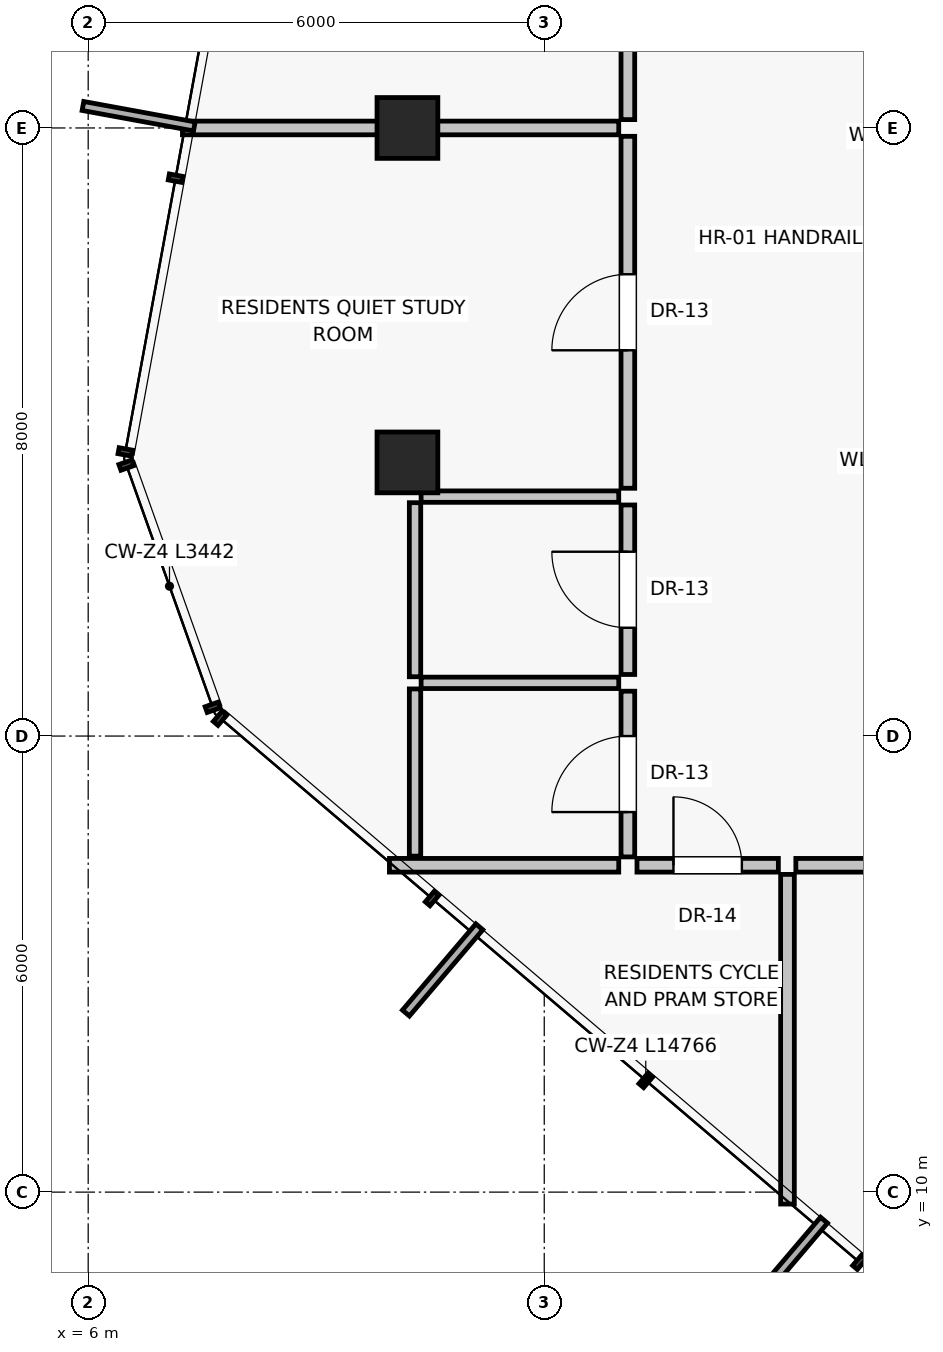
"""IFC4 building model, lengths in metres.
Left out: names, types, materials, properties, quantities, classifications, styles, units other than length and angle.
Written with IfcOpenShell. Run it as: python <this file> out.ifc"""

import sys

from ifc_helpers import new_model, si_unit, direction, frame, frame_2d, origin, origin_2d, place, context, subcontext, project, spatial, rectangle, extrude, source, transform, mapped, element, fill, save


model = new_model("IFC4")
c1 = context("Model", 3, precision=1e-05, world=origin(), true_north=direction((0.0, 1.0)))
c2 = subcontext(c1, "Body", "Model", "MODEL_VIEW")
j1 = project(units=[si_unit("LENGTHUNIT", "METRE"), si_unit("PLANEANGLEUNIT", "RADIAN")], contexts=[c1])
p1 = place(None, origin())
s1 = spatial("IfcSite", under=j1, at=p1, CompositionType="ELEMENT")
p2 = place(p1, origin())
s2 = spatial("IfcBuilding", under=s1, at=p2, CompositionType="ELEMENT")
p3 = place(p2, frame((0.0, 0.0, 244.75)))
s3 = spatial("IfcBuildingStorey", under=s2, at=p3, CompositionType="ELEMENT", Elevation=244.75)
for number, where, z_axis, x_axis in (
    (1, (10.2, 24.0, 0.0), (0.0, 0.0, 1.0), (1.0, 0.0, 0.0)),
    (2, (10.2, 19.6, 0.0), (0.0, 0.0, 1.0), (1.0, 0.0, 0.0)),
):
    element("IfcColumn", number, at=place(p3, frame(where, z_axis=z_axis, x_axis=x_axis)), inside=s3, PredefinedType="COLUMN", context=c2, shape_type="SweptSolid", body=[
        extrude(rectangle(XDim=0.8, YDim=0.8, at=origin_2d()), origin(), (0.0, 0.0, 1.0), 3.25),
    ])
p4 = place(p3, frame((15.2, 14.18, 0.0), z_axis=(0.0, 0.0, 1.0), x_axis=(0.0, -1.0, 0.0)))
e3 = element("IfcWall", 3, at=p4, inside=s3, PredefinedType="PARTITIONING", context=c2, shape_type="SweptSolid", body=[
    extrude(rectangle(XDim=4.337, YDim=0.18, at=frame_2d((2.168, 0.0))), origin(), (0.0, 0.0, 1.0), 3.015),
])
p5 = place(p3, frame((15.31, 14.3, 0.0), z_axis=(0.0, 0.0, 1.0), x_axis=(1.0, 0.0, 0.0)))
e4 = element("IfcWall", 4, at=p5, inside=s3, PredefinedType="PARTITIONING", context=c2, shape_type="SweptSolid", body=[
    extrude(rectangle(XDim=8.05, YDim=0.18, at=frame_2d((4.025, 0.0))), origin(), (0.0, 0.0, 1.0), 3.015),
])
p6 = place(p5, frame((3.125, 0.0, 0.0)))
e5 = element("IfcOpeningElement", 5, at=p6, cuts=e4, PredefinedType="OPENING", context=c2, shape_type="SweptSolid", body=[
    extrude(rectangle(XDim=1.8, YDim=2.25, at=frame_2d((0.9, 1.125))), frame((0.0, 0.1, 0.0), z_axis=(0.0, -1.0, 0.0), x_axis=(1.0, 0.0, 0.0)), (0.0, 0.0, 1.0), 0.2),
])
p7 = place(p3, frame((12.98, 14.3, 0.0), z_axis=(0.0, 0.0, 1.0), x_axis=(-1.0, 0.0, 0.0)))
e6 = element("IfcWall", 6, at=p7, inside=s3, PredefinedType="PARTITIONING", context=c2, shape_type="SweptSolid", body=[
    extrude(rectangle(XDim=3.017, YDim=0.18, at=frame_2d((1.508, 0.0))), origin(), (0.0, 0.0, 1.0), 3.015),
])
p8 = place(p3, frame((13.1, 14.41, 0.0), z_axis=(0.0, 0.0, 1.0), x_axis=(0.0, 1.0, 0.0)))
e7 = element("IfcWall", 7, at=p8, inside=s3, PredefinedType="PARTITIONING", context=c2, shape_type="SweptSolid", body=[
    extrude(rectangle(XDim=2.18, YDim=0.18, at=frame_2d((1.09, 0.0))), origin(), (0.0, 0.0, 1.0), 3.015),
])
p9 = place(p8, frame((0.59, 0.0, 0.0)))
e8 = element("IfcOpeningElement", 8, at=p9, cuts=e7, PredefinedType="OPENING", context=c2, shape_type="SweptSolid", body=[
    extrude(rectangle(XDim=1.0, YDim=2.01, at=frame_2d((0.5, 1.005))), frame((0.0, 0.1, 0.0), z_axis=(0.0, -1.0, 0.0), x_axis=(1.0, 0.0, 0.0)), (0.0, 0.0, 1.0), 0.2),
])
p10 = place(p3, frame((13.1, 16.81, 0.0), z_axis=(0.0, 0.0, 1.0), x_axis=(0.0, 1.0, 0.0)))
e9 = element("IfcWall", 9, at=p10, inside=s3, PredefinedType="PARTITIONING", context=c2, shape_type="SweptSolid", body=[
    extrude(rectangle(XDim=2.23, YDim=0.18, at=frame_2d((1.115, 0.0))), origin(), (0.0, 0.0, 1.0), 2.662),
])
p11 = place(p10, frame((0.615, 0.0, 0.0)))
e10 = element("IfcOpeningElement", 10, at=p11, cuts=e9, PredefinedType="OPENING", context=c2, shape_type="SweptSolid", body=[
    extrude(rectangle(XDim=1.0, YDim=2.01, at=frame_2d((0.5, 1.005))), frame((0.0, 0.1, 0.0), z_axis=(0.0, -1.0, 0.0), x_axis=(1.0, 0.0, 0.0)), (0.0, 0.0, 1.0), 0.2),
])
p12 = place(p3, frame((13.1, 19.26, 0.0), z_axis=(0.0, 0.0, 1.0), x_axis=(0.0, 1.0, 0.0)))
e11 = element("IfcWall", 11, at=p12, inside=s3, PredefinedType="PARTITIONING", context=c2, shape_type="SweptSolid", body=[
    extrude(rectangle(XDim=4.63, YDim=0.18, at=frame_2d((2.315, 0.0))), origin(), (0.0, 0.0, 1.0), 2.662),
])
p13 = place(p12, frame((1.815, 0.0, 0.0)))
e12 = element("IfcOpeningElement", 12, at=p13, cuts=e11, PredefinedType="OPENING", context=c2, shape_type="SweptSolid", body=[
    extrude(rectangle(XDim=1.0, YDim=2.01, at=frame_2d((0.5, 1.005))), frame((0.0, 0.1, 0.0), z_axis=(0.0, -1.0, 0.0), x_axis=(1.0, 0.0, 0.0)), (0.0, 0.0, 1.0), 0.2),
])
p14 = place(p3, frame((13.1, 24.11, 0.0), z_axis=(0.0, 0.0, 1.0), x_axis=(0.0, 1.0, 0.0)))
e13 = element("IfcWall", 13, at=p14, inside=s3, PredefinedType="PARTITIONING", context=c2, shape_type="SweptSolid", body=[
    extrude(rectangle(XDim=9.28, YDim=0.18, at=frame_2d((4.64, 0.0))), origin(), (0.0, 0.0, 1.0), 2.662),
])
p15 = place(p14, frame((4.14, 0.0, 0.0)))
e14 = element("IfcOpeningElement", 14, at=p15, cuts=e13, PredefinedType="OPENING", context=c2, shape_type="SweptSolid", body=[
    extrude(rectangle(XDim=1.0, YDim=2.01, at=frame_2d((0.5, 1.005))), frame((0.0, 0.1, 0.0), z_axis=(0.0, -1.0, 0.0), x_axis=(1.0, 0.0, 0.0)), (0.0, 0.0, 1.0), 0.2),
])
for number, where, z_axis, x_axis in (
    (15, (12.98, 16.7, 0.0), (0.0, 0.0, 1.0), (-1.0, 0.0, 0.0)),
    (16, (12.98, 19.15, 0.0), (0.0, 0.0, 1.0), (-1.0, 0.0, 0.0)),
):
    element("IfcWall", number, at=place(p3, frame(where, z_axis=z_axis, x_axis=x_axis)), inside=s3, PredefinedType="PARTITIONING", context=c2, shape_type="SweptSolid", body=[
        extrude(rectangle(XDim=2.6, YDim=0.15, at=frame_2d((1.3, 0.0))), origin(), (0.0, 0.0, 1.0), 3.015),
    ])
p16 = place(p3, frame((10.3, 14.42, 0.0), z_axis=(0.0, 0.0, 1.0), x_axis=(0.0, 1.0, 0.0)))
e17 = element("IfcWall", 17, at=p16, inside=s3, PredefinedType="PARTITIONING", context=c2, shape_type="SweptSolid", body=[
    extrude(rectangle(XDim=2.2, YDim=0.15, at=frame_2d((1.1, 0.0))), origin(), (0.0, 0.0, 1.0), 3.015),
])
p17 = place(p3, frame((10.3, 16.78, 0.0), z_axis=(0.0, 0.0, 1.0), x_axis=(0.0, 1.0, 0.0)))
e18 = element("IfcWall", 18, at=p17, inside=s3, PredefinedType="PARTITIONING", context=c2, shape_type="SweptSolid", body=[
    extrude(rectangle(XDim=2.29, YDim=0.15, at=frame_2d((1.145, 0.0))), origin(), (0.0, 0.0, 1.0), 3.015),
])
p18 = place(p3, frame((12.98, 24.0, 0.0), z_axis=(0.0, 0.0, 1.0), x_axis=(-1.0, 0.0, 0.0)))
e19 = element("IfcWall", 19, at=p18, inside=s3, PredefinedType="PARTITIONING", context=c2, shape_type="SweptSolid", body=[
    extrude(rectangle(XDim=5.74, YDim=0.18, at=frame_2d((2.87, 0.0))), origin(), (0.0, 0.0, 1.0), 3.015),
])
p19 = place(p3, frame((13.22, 14.3, 0.0), z_axis=(0.0, 0.0, 1.0), x_axis=(1.0, 0.0, 0.0)))
e20 = element("IfcWall", 20, at=p19, inside=s3, PredefinedType="PARTITIONING", context=c2, shape_type="SweptSolid", body=[
    extrude(rectangle(XDim=1.86, YDim=0.18, at=frame_2d((0.93, 0.0))), origin(), (0.0, 0.0, 1.0), 3.015),
])
p20 = place(p19, frame((0.48, 0.0, 0.0)))
e21 = element("IfcOpeningElement", 21, at=p20, cuts=e20, PredefinedType="OPENING", context=c2, shape_type="SweptSolid", body=[
    extrude(rectangle(XDim=0.9, YDim=2.01, at=frame_2d((0.45, 1.005))), frame((0.0, 0.1, 0.0), z_axis=(0.0, -1.0, 0.0), x_axis=(1.0, 0.0, 0.0)), (0.0, 0.0, 1.0), 0.2),
])
m1 = source(origin(), c2, "Body", "SweptSolid", [
    extrude(rectangle(XDim=1.0, YDim=2.01, at=frame_2d((0.5, 1.005))), frame((0.0, 0.025, 0.0), z_axis=(0.0, -1.0, 0.0), x_axis=(1.0, 0.0, 0.0)), (0.0, 0.0, 1.0), 0.05),
])
p21 = place(p9, origin())
e22 = element("IfcDoor", 22, at=p21, inside=s3, OperationType="SINGLE_SWING_LEFT", PredefinedType="DOOR", context=c2, shape_type="MappedRepresentation", body=[
    mapped(m1, transform((0.0, 0.0, 0.0), scale=1.0)),
])
fill(e8, e22)
p22 = place(p11, origin())
e23 = element("IfcDoor", 23, at=p22, inside=s3, OperationType="SINGLE_SWING_RIGHT", PredefinedType="DOOR", context=c2, shape_type="MappedRepresentation", body=[
    mapped(m1, transform((0.0, 0.0, 0.0), scale=1.0)),
])
fill(e10, e23)
p23 = place(p13, origin())
e24 = element("IfcDoor", 24, at=p23, inside=s3, OperationType="SINGLE_SWING_LEFT", PredefinedType="DOOR", context=c2, shape_type="MappedRepresentation", body=[
    mapped(m1, transform((0.0, 0.0, 0.0), scale=1.0)),
])
fill(e12, e24)
m2 = source(origin(), c2, "Body", "SweptSolid", [
    extrude(rectangle(XDim=0.9, YDim=2.01, at=frame_2d((0.45, 1.005))), frame((0.0, 0.025, 0.0), z_axis=(0.0, -1.0, 0.0), x_axis=(1.0, 0.0, 0.0)), (0.0, 0.0, 1.0), 0.05),
])
p24 = place(p20, origin())
e25 = element("IfcDoor", 25, at=p24, inside=s3, OperationType="SINGLE_SWING_LEFT", PredefinedType="DOOR", context=c2, shape_type="MappedRepresentation", body=[
    mapped(m2, transform((0.0, 0.0, 0.0), scale=1.0)),
])
fill(e21, e25)
save(model, sys.argv[1])
